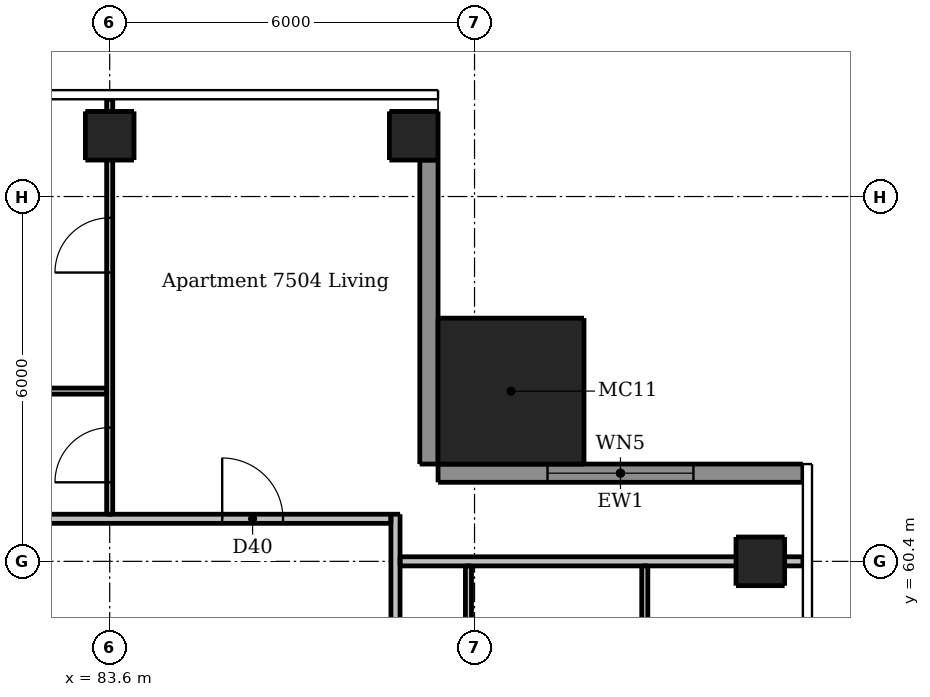
"""IFC4 building model, lengths in metres.
Left out: names, types, materials, properties, quantities, classifications, styles, units other than length and angle.
Written with IfcOpenShell. Run it as: python <this file> out.ifc"""

import sys

from ifc_helpers import new_model, si_unit, direction, frame, frame_2d, origin, origin_2d, place, context, subcontext, project, spatial, rectangle, extrude, element, fill, save


model = new_model("IFC4")
c1 = context("Model", 3, precision=1e-05, world=origin(), true_north=direction((0.0, 1.0)))
c2 = subcontext(c1, "Body", "Model", "MODEL_VIEW")
j1 = project(units=[si_unit("LENGTHUNIT", "METRE"), si_unit("PLANEANGLEUNIT", "RADIAN")], contexts=[c1])
p1 = place(None, origin())
s1 = spatial("IfcSite", under=j1, at=p1, CompositionType="ELEMENT")
p2 = place(p1, origin())
s2 = spatial("IfcBuilding", under=s1, at=p2, CompositionType="ELEMENT")
p3 = place(p2, frame((0.0, 0.0, 278.5)))
s3 = spatial("IfcBuildingStorey", under=s2, at=p3, CompositionType="ELEMENT", Elevation=278.5)
for number, where, z_axis, x_axis in (
    (1, (94.3, 60.4, 0.0), (0.0, 0.0, 1.0), (1.0, 0.0, 0.0)),
    (2, (83.6, 67.4, 0.0), (0.0, 0.0, 1.0), (1.0, 0.0, 0.0)),
    (3, (88.6, 67.4, 0.0), (0.0, 0.0, 1.0), (1.0, 0.0, 0.0)),
):
    element("IfcColumn", number, at=place(p3, frame(where, z_axis=z_axis, x_axis=x_axis)), inside=s3, PredefinedType="COLUMN", context=c2, shape_type="SweptSolid", body=[
        extrude(rectangle(XDim=0.8, YDim=0.8, at=origin_2d()), origin(), (0.0, 0.0, 1.0), 3.0),
    ])
p4 = place(p3, frame((90.2, 63.2, 0.0), z_axis=(0.0, 0.0, 1.0), x_axis=(1.0, 0.0, 0.0)))
e4 = element("IfcColumn", 4, at=p4, inside=s3, PredefinedType="COLUMN", context=c2, shape_type="SweptSolid", body=[
    extrude(rectangle(XDim=2.4, YDim=2.4, at=origin_2d()), origin(), (0.0, 0.0, 1.0), 3.3),
])
p5 = place(p3, frame((95.0, 61.85, 0.0), z_axis=(0.0, 0.0, 1.0), x_axis=(-1.0, 0.0, 0.0)))
e5 = element("IfcWall", 5, at=p5, inside=s3, PredefinedType="SOLIDWALL", context=c2, shape_type="SweptSolid", body=[
    extrude(rectangle(XDim=6.0, YDim=0.3, at=frame_2d((3.0, 0.0))), origin(), (0.0, 0.0, 1.0), 3.0),
])
p6 = place(p5, frame((1.8, 0.0, 0.15)))
e6 = element("IfcOpeningElement", 6, at=p6, cuts=e5, PredefinedType="OPENING", context=c2, shape_type="SweptSolid", body=[
    extrude(rectangle(XDim=2.4, YDim=2.1, at=frame_2d((1.2, 1.05))), frame((0.0, 0.16, 0.0), z_axis=(0.0, -1.0, 0.0), x_axis=(1.0, 0.0, 0.0)), (0.0, 0.0, 1.0), 0.32),
])
p7 = place(p3, frame((88.85, 62.0, 0.0), z_axis=(0.0, 0.0, 1.0), x_axis=(0.0, 1.0, 0.0)))
e7 = element("IfcWall", 7, at=p7, inside=s3, PredefinedType="SOLIDWALL", context=c2, shape_type="SweptSolid", body=[
    extrude(rectangle(XDim=5.0, YDim=0.3, at=frame_2d((2.5, 0.0))), origin(), (0.0, 0.0, 1.0), 3.0),
])
p8 = place(p3, frame((83.6, 61.175, 0.0), z_axis=(0.0, 0.0, 1.0), x_axis=(0.0, 1.0, 0.0)))
e8 = element("IfcWall", 8, at=p8, inside=s3, PredefinedType="PARTITIONING", context=c2, shape_type="SweptSolid", body=[
    extrude(rectangle(XDim=6.825, YDim=0.1, at=frame_2d((3.413, 0.0))), origin(), (0.0, 0.0, 1.0), 2.466),
])
p9 = place(p8, frame((0.525, 0.0, 0.0)))
e9 = element("IfcOpeningElement", 9, at=p9, cuts=e8, PredefinedType="OPENING", context=c2, shape_type="SweptSolid", body=[
    extrude(rectangle(XDim=0.9, YDim=2.1, at=frame_2d((0.45, 1.05))), frame((0.0, 0.06, 0.0), z_axis=(0.0, -1.0, 0.0), x_axis=(1.0, 0.0, 0.0)), (0.0, 0.0, 1.0), 0.12),
])
p10 = place(p8, frame((3.975, 0.0, 0.0)))
e10 = element("IfcOpeningElement", 10, at=p10, cuts=e8, PredefinedType="OPENING", context=c2, shape_type="SweptSolid", body=[
    extrude(rectangle(XDim=0.9, YDim=2.1, at=frame_2d((0.45, 1.05))), frame((0.0, 0.06, 0.0), z_axis=(0.0, -1.0, 0.0), x_axis=(1.0, 0.0, 0.0)), (0.0, 0.0, 1.0), 0.12),
])
p11 = place(p3, frame((89.5, 60.325, 0.0), z_axis=(0.0, 0.0, 1.0), x_axis=(0.0, -1.0, 0.0)))
e11 = element("IfcWall", 11, at=p11, inside=s3, PredefinedType="PARTITIONING", context=c2, shape_type="SweptSolid", body=[
    extrude(rectangle(XDim=17.85, YDim=0.1, at=frame_2d((8.925, 0.0))), origin(), (0.0, 0.0, 1.0), 3.0),
])
p12 = place(p11, frame((6.075, 0.0, 0.0)))
e12 = element("IfcOpeningElement", 12, at=p12, cuts=e11, PredefinedType="OPENING", context=c2, shape_type="SweptSolid", body=[
    extrude(rectangle(XDim=0.9, YDim=2.1, at=frame_2d((0.45, 1.05))), frame((0.0, 0.06, 0.0), z_axis=(0.0, -1.0, 0.0), x_axis=(1.0, 0.0, 0.0)), (0.0, 0.0, 1.0), 0.12),
])
p13 = place(p11, frame((0.975, 0.0, 0.0)))
e13 = element("IfcOpeningElement", 13, at=p13, cuts=e11, PredefinedType="OPENING", context=c2, shape_type="SweptSolid", body=[
    extrude(rectangle(XDim=0.9, YDim=2.1, at=frame_2d((0.45, 1.05))), frame((0.0, 0.06, 0.0), z_axis=(0.0, -1.0, 0.0), x_axis=(1.0, 0.0, 0.0)), (0.0, 0.0, 1.0), 0.12),
])
p14 = place(p11, frame((3.375, 0.0, 0.0)))
e14 = element("IfcOpeningElement", 14, at=p14, cuts=e11, PredefinedType="OPENING", context=c2, shape_type="SweptSolid", body=[
    extrude(rectangle(XDim=0.9, YDim=2.1, at=frame_2d((0.45, 1.05))), frame((0.0, 0.06, 0.0), z_axis=(0.0, -1.0, 0.0), x_axis=(1.0, 0.0, 0.0)), (0.0, 0.0, 1.0), 0.12),
])
p15 = place(p11, frame((10.575, 0.0, 0.0)))
e15 = element("IfcOpeningElement", 15, at=p15, cuts=e11, PredefinedType="OPENING", context=c2, shape_type="SweptSolid", body=[
    extrude(rectangle(XDim=0.9, YDim=2.1, at=frame_2d((0.45, 1.05))), frame((0.0, 0.06, 0.0), z_axis=(0.0, -1.0, 0.0), x_axis=(1.0, 0.0, 0.0)), (0.0, 0.0, 1.0), 0.12),
])
p16 = place(p11, frame((8.825, 0.0, 0.0)))
e16 = element("IfcOpeningElement", 16, at=p16, cuts=e11, PredefinedType="OPENING", context=c2, shape_type="SweptSolid", body=[
    extrude(rectangle(XDim=0.8, YDim=2.1, at=frame_2d((0.4, 1.05))), frame((0.0, 0.06, 0.0), z_axis=(0.0, -1.0, 0.0), x_axis=(1.0, 0.0, 0.0)), (0.0, 0.0, 1.0), 0.12),
])
p17 = place(p11, frame((15.675, 0.0, 0.0)))
e17 = element("IfcOpeningElement", 17, at=p17, cuts=e11, PredefinedType="OPENING", context=c2, shape_type="SweptSolid", body=[
    extrude(rectangle(XDim=0.9, YDim=2.1, at=frame_2d((0.45, 1.05))), frame((0.0, 0.06, 0.0), z_axis=(0.0, -1.0, 0.0), x_axis=(1.0, 0.0, 0.0)), (0.0, 0.0, 1.0), 0.12),
])
p18 = place(p11, frame((12.725, 0.0, 0.0)))
e18 = element("IfcOpeningElement", 18, at=p18, cuts=e11, PredefinedType="OPENING", context=c2, shape_type="SweptSolid", body=[
    extrude(rectangle(XDim=0.8, YDim=2.1, at=frame_2d((0.4, 1.05))), frame((0.0, 0.06, 0.0), z_axis=(0.0, -1.0, 0.0), x_axis=(1.0, 0.0, 0.0)), (0.0, 0.0, 1.0), 0.12),
])
p19 = place(p3, frame((92.4, 55.55, 0.0), z_axis=(0.0, 0.0, 1.0), x_axis=(0.0, 1.0, 0.0)))
e19 = element("IfcWall", 19, at=p19, inside=s3, PredefinedType="PARTITIONING", context=c2, shape_type="SweptSolid", body=[
    extrude(rectangle(XDim=4.775, YDim=0.1, at=frame_2d((2.387, 0.0))), origin(), (0.0, 0.0, 1.0), 3.0),
])
p20 = place(p3, frame((83.55, 63.2, 0.0), z_axis=(0.0, 0.0, 1.0), x_axis=(-1.0, 0.0, 0.0)))
e20 = element("IfcWall", 20, at=p20, inside=s3, PredefinedType="PARTITIONING", context=c2, shape_type="SweptSolid", body=[
    extrude(rectangle(XDim=5.875, YDim=0.1, at=frame_2d((2.938, 0.0))), origin(), (0.0, 0.0, 1.0), 3.0),
])
p21 = place(p20, frame((3.75, 0.0, 0.0)))
e21 = element("IfcOpeningElement", 21, at=p21, cuts=e20, PredefinedType="OPENING", context=c2, shape_type="SweptSolid", body=[
    extrude(rectangle(XDim=0.8, YDim=2.1, at=frame_2d((0.4, 1.05))), frame((0.0, 0.06, 0.0), z_axis=(0.0, -1.0, 0.0), x_axis=(1.0, 0.0, 0.0)), (0.0, 0.0, 1.0), 0.12),
])
p22 = place(p3, frame((88.3, 61.175, 0.0), z_axis=(0.0, 0.0, 1.0), x_axis=(0.0, -1.0, 0.0)))
e22 = element("IfcWall", 22, at=p22, inside=s3, PredefinedType="PARTITIONING", context=c2, shape_type="SweptSolid", body=[
    extrude(rectangle(XDim=29.4, YDim=0.15, at=frame_2d((14.7, 0.0))), origin(), (0.0, 0.0, 1.0), 3.0),
])
p23 = place(p22, frame((26.625, 0.0, 0.0)))
e23 = element("IfcOpeningElement", 23, at=p23, cuts=e22, PredefinedType="OPENING", context=c2, shape_type="SweptSolid", body=[
    extrude(rectangle(XDim=1.0, YDim=2.1, at=frame_2d((0.5, 1.05))), frame((0.0, 0.085, 0.0), z_axis=(0.0, -1.0, 0.0), x_axis=(1.0, 0.0, 0.0)), (0.0, 0.0, 1.0), 0.17),
])
p24 = place(p22, frame((9.275, 0.0, 0.0)))
e24 = element("IfcOpeningElement", 24, at=p24, cuts=e22, PredefinedType="OPENING", context=c2, shape_type="SweptSolid", body=[
    extrude(rectangle(XDim=1.0, YDim=2.1, at=frame_2d((0.5, 1.05))), frame((0.0, 0.085, 0.0), z_axis=(0.0, -1.0, 0.0), x_axis=(1.0, 0.0, 0.0)), (0.0, 0.0, 1.0), 0.17),
])
p25 = place(p3, frame((58.975, 61.1, 0.0), z_axis=(0.0, 0.0, 1.0), x_axis=(1.0, 0.0, 0.0)))
e25 = element("IfcWall", 25, at=p25, inside=s3, PredefinedType="PARTITIONING", context=c2, shape_type="SweptSolid", body=[
    extrude(rectangle(XDim=29.25, YDim=0.15, at=frame_2d((14.625, 0.0))), origin(), (0.0, 0.0, 1.0), 3.0),
])
p26 = place(p25, frame((9.125, 0.0, 0.0)))
e26 = element("IfcOpeningElement", 26, at=p26, cuts=e25, PredefinedType="OPENING", context=c2, shape_type="SweptSolid", body=[
    extrude(rectangle(XDim=1.0, YDim=2.1, at=frame_2d((0.5, 1.05))), frame((0.0, 0.085, 0.0), z_axis=(0.0, -1.0, 0.0), x_axis=(1.0, 0.0, 0.0)), (0.0, 0.0, 1.0), 0.17),
])
p27 = place(p25, frame((26.475, 0.0, 0.0)))
e27 = element("IfcOpeningElement", 27, at=p27, cuts=e25, PredefinedType="OPENING", context=c2, shape_type="SweptSolid", body=[
    extrude(rectangle(XDim=1.0, YDim=2.1, at=frame_2d((0.5, 1.05))), frame((0.0, 0.085, 0.0), z_axis=(0.0, -1.0, 0.0), x_axis=(1.0, 0.0, 0.0)), (0.0, 0.0, 1.0), 0.17),
])
p28 = place(p3, frame((88.375, 60.4, 0.0), z_axis=(0.0, 0.0, 1.0), x_axis=(1.0, 0.0, 0.0)))
e28 = element("IfcWall", 28, at=p28, inside=s3, PredefinedType="PARTITIONING", context=c2, shape_type="SweptSolid", body=[
    extrude(rectangle(XDim=6.625, YDim=0.15, at=frame_2d((3.312, 0.0))), origin(), (0.0, 0.0, 1.0), 2.597),
])
p29 = place(p6, origin())
e29 = element("IfcWindow", 29, at=p29, inside=s3, PartitioningType="DOUBLE_PANEL_VERTICAL", PredefinedType="WINDOW", context=c2, shape_type="SweptSolid", body=[
    extrude(rectangle(XDim=2.4, YDim=2.1, at=frame_2d((1.2, 1.05))), frame((0.0, 0.03, 0.0), z_axis=(0.0, -1.0, 0.0), x_axis=(1.0, 0.0, 0.0)), (0.0, 0.0, 1.0), 0.06),
])
fill(e6, e29)
p30 = place(p27, origin())
e30 = element("IfcDoor", 30, at=p30, inside=s3, OperationType="SINGLE_SWING_LEFT", PredefinedType="DOOR", context=c2, shape_type="SweptSolid", body=[
    extrude(rectangle(XDim=1.0, YDim=2.1, at=frame_2d((0.5, 1.05))), frame((0.0, 0.025, 0.0), z_axis=(0.0, -1.0, 0.0), x_axis=(1.0, 0.0, 0.0)), (0.0, 0.0, 1.0), 0.05),
])
fill(e27, e30)
p31 = place(p9, origin())
e31 = element("IfcDoor", 31, at=p31, inside=s3, OperationType="SINGLE_SWING_LEFT", PredefinedType="DOOR", context=c2, shape_type="SweptSolid", body=[
    extrude(rectangle(XDim=0.9, YDim=2.1, at=frame_2d((0.45, 1.05))), frame((0.0, 0.025, 0.0), z_axis=(0.0, -1.0, 0.0), x_axis=(1.0, 0.0, 0.0)), (0.0, 0.0, 1.0), 0.05),
])
fill(e9, e31)
p32 = place(p10, origin())
e32 = element("IfcDoor", 32, at=p32, inside=s3, OperationType="SINGLE_SWING_LEFT", PredefinedType="DOOR", context=c2, shape_type="SweptSolid", body=[
    extrude(rectangle(XDim=0.9, YDim=2.1, at=frame_2d((0.45, 1.05))), frame((0.0, 0.025, 0.0), z_axis=(0.0, -1.0, 0.0), x_axis=(1.0, 0.0, 0.0)), (0.0, 0.0, 1.0), 0.05),
])
fill(e10, e32)
save(model, sys.argv[1])
